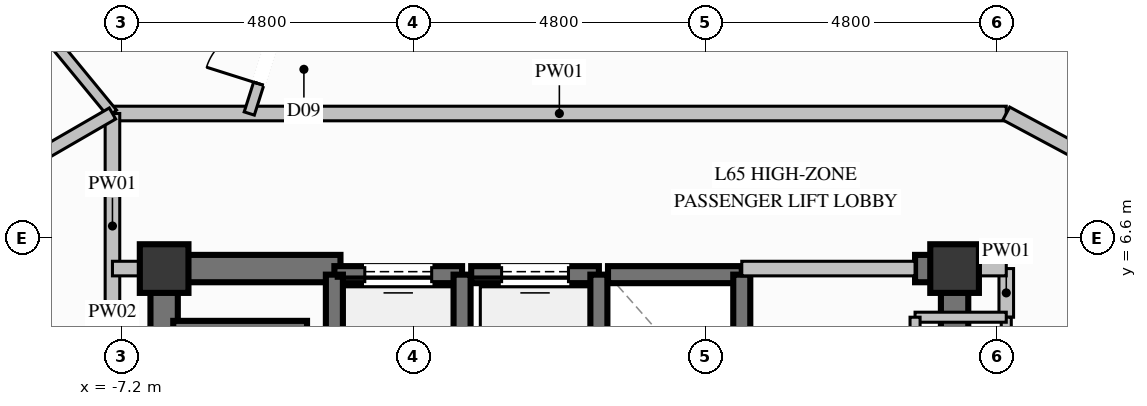
"""IFC4 building model, lengths in metres.
Left out: names, types, materials, properties, quantities, classifications, styles, units other than length and angle.
Written with IfcOpenShell. Run it as: python <this file> out.ifc"""

import sys

from ifc_helpers import new_model, si_unit, direction, frame, frame_2d, origin, origin_2d, place, context, subcontext, project, spatial, rectangle, extrude, element, fill, save


model = new_model("IFC4")
c1 = context("Model", 3, precision=1e-05, world=origin(), true_north=direction((0.0, 1.0)))
c2 = subcontext(c1, "Body", "Model", "MODEL_VIEW")
j1 = project(units=[si_unit("LENGTHUNIT", "METRE"), si_unit("PLANEANGLEUNIT", "RADIAN")], contexts=[c1])
p1 = place(None, origin())
s1 = spatial("IfcSite", under=j1, at=p1, CompositionType="ELEMENT")
p2 = place(p1, origin())
s2 = spatial("IfcBuilding", under=s1, at=p2, CompositionType="ELEMENT")
p3 = place(p2, frame((0.0, 0.0, 250.6)))
s3 = spatial("IfcBuildingStorey", under=s2, at=p3, CompositionType="ELEMENT", Elevation=250.6)
for number, where, z_axis, x_axis in (
    (1, (6.5, 6.1, 0.0), (0.0, 0.0, 1.0), (1.0, 0.0, 0.0)),
    (2, (-6.5, 6.1, 0.0), (0.0, 0.0, 1.0), (1.0, 0.0, 0.0)),
):
    element("IfcColumn", number, at=place(p3, frame(where, z_axis=z_axis, x_axis=x_axis)), inside=s3, PredefinedType="COLUMN", context=c2, shape_type="SweptSolid", body=[
        extrude(rectangle(XDim=0.8, YDim=0.8, at=origin_2d()), origin(), (0.0, 0.0, 1.0), 3.8),
    ])
p4 = place(p3, frame((-6.275, 6.1, 0.0), z_axis=(0.0, 0.0, 1.0), x_axis=(1.0, 0.0, 0.0)))
e3 = element("IfcWall", 3, at=p4, inside=s3, PredefinedType="SHEAR", context=c2, shape_type="SweptSolid", body=[
    extrude(rectangle(XDim=2.675, YDim=0.45, at=frame_2d((1.337, 0.0))), origin(), (0.0, 0.0, 1.0), 3.8),
])
p5 = place(p3, frame((5.85, 6.1, 0.0), z_axis=(0.0, 0.0, 1.0), x_axis=(1.0, 0.0, 0.0)))
e4 = element("IfcWall", 4, at=p5, inside=s3, PredefinedType="SHEAR", context=c2, shape_type="SweptSolid", body=[
    extrude(rectangle(XDim=0.425, YDim=0.45, at=frame_2d((0.212, 0.0))), origin(), (0.0, 0.0, 1.0), 3.8),
])
p6 = place(p3, frame((-6.5, 2.35, 0.0), z_axis=(0.0, 0.0, 1.0), x_axis=(0.0, 1.0, 0.0)))
e5 = element("IfcWall", 5, at=p6, inside=s3, PredefinedType="SHEAR", context=c2, shape_type="SweptSolid", body=[
    extrude(rectangle(XDim=3.975, YDim=0.45, at=frame_2d((1.987, 0.0))), origin(), (0.0, 0.0, 1.0), 3.8),
])
p7 = place(p3, frame((6.5, 3.35, 0.0), z_axis=(0.0, 0.0, 1.0), x_axis=(0.0, 1.0, 0.0)))
e6 = element("IfcWall", 6, at=p7, inside=s3, PredefinedType="SHEAR", context=c2, shape_type="SweptSolid", body=[
    extrude(rectangle(XDim=2.975, YDim=0.45, at=frame_2d((1.487, 0.0))), origin(), (0.0, 0.0, 1.0), 3.8),
])
p8 = place(p3, frame((-1.6, 6.0, 0.0), z_axis=(0.0, 0.0, 1.0), x_axis=(-1.0, 0.0, 0.0)))
e7 = element("IfcWall", 7, at=p8, inside=s3, PredefinedType="SOLIDWALL", context=c2, shape_type="SweptSolid", body=[
    extrude(rectangle(XDim=2.1, YDim=0.28, at=frame_2d((1.05, 0.0))), origin(), (0.0, 0.0, 1.0), 3.57),
])
p9 = place(p8, frame((0.5, 0.0, 0.0)))
e8 = element("IfcOpeningElement", 8, at=p9, cuts=e7, PredefinedType="OPENING", context=c2, shape_type="SweptSolid", body=[
    extrude(rectangle(XDim=1.1, YDim=2.2, at=frame_2d((0.55, 1.1))), frame((0.0, 0.15, 0.0), z_axis=(0.0, -1.0, 0.0), x_axis=(1.0, 0.0, 0.0)), (0.0, 0.0, 1.0), 0.3),
])
for number, where, z_axis, x_axis in (
    (9, (-3.7, 6.0, 0.0), (0.0, 0.0, 1.0), (0.0, -1.0, 0.0)),
    (10, (-1.6, 3.5, 0.0), (0.0, 0.0, 1.0), (0.0, 1.0, 0.0)),
):
    element("IfcWall", number, at=place(p3, frame(where, z_axis=z_axis, x_axis=x_axis)), inside=s3, PredefinedType="SOLIDWALL", context=c2, shape_type="SweptSolid", body=[
        extrude(rectangle(XDim=2.5, YDim=0.28, at=frame_2d((1.25, 0.0))), origin(), (0.0, 0.0, 1.0), 3.57),
    ])
p10 = place(p3, frame((0.65, 6.0, 0.0), z_axis=(0.0, 0.0, 1.0), x_axis=(-1.0, 0.0, 0.0)))
e11 = element("IfcWall", 11, at=p10, inside=s3, PredefinedType="SOLIDWALL", context=c2, shape_type="SweptSolid", body=[
    extrude(rectangle(XDim=2.1, YDim=0.28, at=frame_2d((1.05, 0.0))), origin(), (0.0, 0.0, 1.0), 3.57),
])
p11 = place(p10, frame((0.5, 0.0, 0.0)))
e12 = element("IfcOpeningElement", 12, at=p11, cuts=e11, PredefinedType="OPENING", context=c2, shape_type="SweptSolid", body=[
    extrude(rectangle(XDim=1.1, YDim=2.2, at=frame_2d((0.55, 1.1))), frame((0.0, 0.15, 0.0), z_axis=(0.0, -1.0, 0.0), x_axis=(1.0, 0.0, 0.0)), (0.0, 0.0, 1.0), 0.3),
])
p12 = place(p3, frame((0.65, 3.5, 0.0), z_axis=(0.0, 0.0, 1.0), x_axis=(0.0, 1.0, 0.0)))
e13 = element("IfcWall", 13, at=p12, inside=s3, PredefinedType="SOLIDWALL", context=c2, shape_type="SweptSolid", body=[
    extrude(rectangle(XDim=2.5, YDim=0.28, at=frame_2d((1.25, 0.0))), origin(), (0.0, 0.0, 1.0), 3.57),
])
p13 = place(p3, frame((3.0, 6.0, 0.0), z_axis=(0.0, 0.0, 1.0), x_axis=(-1.0, 0.0, 0.0)))
e14 = element("IfcWall", 14, at=p13, inside=s3, PredefinedType="SOLIDWALL", context=c2, shape_type="SweptSolid", body=[
    extrude(rectangle(XDim=2.2, YDim=0.28, at=frame_2d((1.1, 0.0))), origin(), (0.0, 0.0, 1.0), 3.57),
])
p14 = place(p3, frame((3.0, 3.5, 0.0), z_axis=(0.0, 0.0, 1.0), x_axis=(0.0, 1.0, 0.0)))
e15 = element("IfcWall", 15, at=p14, inside=s3, PredefinedType="SOLIDWALL", context=c2, shape_type="SweptSolid", body=[
    extrude(rectangle(XDim=2.5, YDim=0.28, at=frame_2d((1.25, 0.0))), origin(), (0.0, 0.0, 1.0), 3.57),
])
p15 = place(p3, frame((-4.15, 5.1, 0.0), z_axis=(0.0, 0.0, 1.0), x_axis=(-1.0, 0.0, 0.0)))
e16 = element("IfcWall", 16, at=p15, inside=s3, PredefinedType="SOLIDWALL", context=c2, shape_type="SweptSolid", body=[
    extrude(rectangle(XDim=2.2, YDim=0.28, at=frame_2d((1.1, 0.0))), origin(), (0.0, 0.0, 1.0), 3.57),
])
p16 = place(p3, frame((-7.35, 8.65, 0.0), z_axis=(0.0, 0.0, 1.0), x_axis=(1.0, 0.0, 0.0)))
e17 = element("IfcWall", 17, at=p16, inside=s3, PredefinedType="PARTITIONING", context=c2, shape_type="SweptSolid", body=[
    extrude(rectangle(XDim=14.7, YDim=0.24, at=frame_2d((7.35, 0.0))), origin(), (0.0, 0.0, 1.0), 3.57),
])
p17 = place(p3, frame((3.0, 6.1, 0.0), z_axis=(0.0, 0.0, 1.0), x_axis=(1.0, 0.0, 0.0)))
e18 = element("IfcWall", 18, at=p17, inside=s3, PredefinedType="PARTITIONING", context=c2, shape_type="SweptSolid", body=[
    extrude(rectangle(XDim=2.85, YDim=0.24, at=frame_2d((1.425, 0.0))), origin(), (0.0, 0.0, 1.0), 2.655),
])
p18 = place(p3, frame((7.35, 5.3, 0.0), z_axis=(0.0, 0.0, 1.0), x_axis=(0.0, 1.0, 0.0)))
e19 = element("IfcWall", 19, at=p18, inside=s3, PredefinedType="PARTITIONING", context=c2, shape_type="SweptSolid", body=[
    extrude(rectangle(XDim=0.8, YDim=0.24, at=frame_2d((0.4, 0.0))), origin(), (0.0, 0.0, 1.0), 2.655),
])
p19 = place(p3, frame((6.5, 6.1, 0.0), z_axis=(0.0, 0.0, 1.0), x_axis=(1.0, 0.0, 0.0)))
e20 = element("IfcWall", 20, at=p19, inside=s3, PredefinedType="PARTITIONING", context=c2, shape_type="SweptSolid", body=[
    extrude(rectangle(XDim=0.85, YDim=0.24, at=frame_2d((0.425, 0.0))), origin(), (0.0, 0.0, 1.0), 3.086),
])
p20 = place(p3, frame((-7.35, 4.95, 0.0), z_axis=(0.0, 0.0, 1.0), x_axis=(0.0, 1.0, 0.0)))
e21 = element("IfcWall", 21, at=p20, inside=s3, PredefinedType="PARTITIONING", context=c2, shape_type="SweptSolid", body=[
    extrude(rectangle(XDim=3.7, YDim=0.24, at=frame_2d((1.85, 0.0))), origin(), (0.0, 0.0, 1.0), 2.655),
])
p21 = place(p3, frame((-7.35, 6.1, 0.0), z_axis=(0.0, 0.0, 1.0), x_axis=(1.0, 0.0, 0.0)))
e22 = element("IfcWall", 22, at=p21, inside=s3, PredefinedType="PARTITIONING", context=c2, shape_type="SweptSolid", body=[
    extrude(rectangle(XDim=0.85, YDim=0.24, at=frame_2d((0.425, 0.0))), origin(), (0.0, 0.0, 1.0), 3.086),
])
p22 = place(p3, frame((7.35, 2.75, 0.0), z_axis=(0.0, 0.0, 1.0), x_axis=(0.0, 1.0, 0.0)))
e23 = element("IfcWall", 23, at=p22, inside=s3, PredefinedType="PARTITIONING", context=c2, shape_type="SweptSolid", body=[
    extrude(rectangle(XDim=2.55, YDim=0.165, at=frame_2d((1.275, 0.0))), origin(), (0.0, 0.0, 1.0), 3.57),
])
p23 = place(p22, frame((0.75, 0.0, 0.0)))
e24 = element("IfcOpeningElement", 24, at=p23, cuts=e23, PredefinedType="OPENING", context=c2, shape_type="SweptSolid", body=[
    extrude(rectangle(XDim=1.05, YDim=2.15, at=frame_2d((0.525, 1.075))), frame((0.0, 0.093, 0.0), z_axis=(0.0, -1.0, 0.0), x_axis=(1.0, 0.0, 0.0)), (0.0, 0.0, 1.0), 0.185),
])
p24 = place(p3, frame((7.35, 5.3, 0.0), z_axis=(0.0, 0.0, 1.0), x_axis=(-1.0, 0.0, 0.0)))
e25 = element("IfcWall", 25, at=p24, inside=s3, PredefinedType="PARTITIONING", context=c2, shape_type="SweptSolid", body=[
    extrude(rectangle(XDim=1.5, YDim=0.165, at=frame_2d((0.75, 0.0))), origin(), (0.0, 0.0, 1.0), 2.655),
])
p25 = place(p3, frame((5.85, 5.3, 0.0), z_axis=(0.0, 0.0, 1.0), x_axis=(0.0, -1.0, 0.0)))
e26 = element("IfcWall", 26, at=p25, inside=s3, PredefinedType="PARTITIONING", context=c2, shape_type="SweptSolid", body=[
    extrude(rectangle(XDim=2.55, YDim=0.165, at=frame_2d((1.275, 0.0))), origin(), (0.0, 0.0, 1.0), 2.655),
])
p26 = place(p3, frame((-8.779, 10.388, 0.0), z_axis=(0.0, 0.0, 1.0), x_axis=(0.635079503828, -0.772446777337, 0.0)))
e27 = element("IfcWall", 27, at=p26, inside=s3, PredefinedType="PLUMBINGWALL", context=c2, shape_type="SweptSolid", body=[
    extrude(rectangle(XDim=2.25, YDim=0.175, at=frame_2d((1.125, 0.0))), origin(), (0.0, 0.0, 1.0), 3.57),
])
p27 = place(p3, frame((-5.1, 8.65, 0.0), z_axis=(0.0, 0.0, 1.0), x_axis=(0.301724909856, 0.953395027663, 0.0)))
e28 = element("IfcWall", 28, at=p27, inside=s3, PredefinedType="PLUMBINGWALL", context=c2, shape_type="SweptSolid", body=[
    extrude(rectangle(XDim=1.929, YDim=0.175, at=frame_2d((0.964, 0.0))), origin(), (0.0, 0.0, 1.0), 3.57),
])
p28 = place(p27, frame((0.514, 0.0, 0.0)))
e29 = element("IfcOpeningElement", 29, at=p28, cuts=e28, PredefinedType="OPENING", context=c2, shape_type="SweptSolid", body=[
    extrude(rectangle(XDim=0.9, YDim=2.1, at=frame_2d((0.45, 1.05))), frame((0.0, 0.098, 0.0), z_axis=(0.0, -1.0, 0.0), x_axis=(1.0, 0.0, 0.0)), (0.0, 0.0, 1.0), 0.195),
])
p29 = place(p3, frame((-11.065, 6.5, 0.0), z_axis=(0.0, 0.0, 1.0), x_axis=(0.865506757898, 0.50089724698, 0.0)))
e30 = element("IfcWall", 30, at=p29, inside=s3, PredefinedType="PARTITIONING", context=c2, shape_type="SweptSolid", body=[
    extrude(rectangle(XDim=4.292, YDim=0.21, at=frame_2d((2.146, 0.0))), origin(), (0.0, 0.0, 1.0), 3.57),
])
p30 = place(p3, frame((7.35, 8.65, 0.0), z_axis=(0.0, 0.0, 1.0), x_axis=(0.881565227264, -0.472062231151, 0.0)))
e31 = element("IfcWall", 31, at=p30, inside=s3, PredefinedType="PARTITIONING", context=c2, shape_type="SweptSolid", body=[
    extrude(rectangle(XDim=4.554, YDim=0.24, at=frame_2d((2.277, 0.0))), origin(), (0.0, 0.0, 1.0), 3.57),
])
p31 = place(p30, frame((1.777, 0.0, 0.0)))
e32 = element("IfcOpeningElement", 32, at=p31, cuts=e31, PredefinedType="OPENING", context=c2, shape_type="SweptSolid", body=[
    extrude(rectangle(XDim=1.0, YDim=2.2, at=frame_2d((0.5, 1.1))), frame((0.0, 0.13, 0.0), z_axis=(0.0, -1.0, 0.0), x_axis=(1.0, 0.0, 0.0)), (0.0, 0.0, 1.0), 0.26),
])
p32 = place(p9, origin())
e33 = element("IfcDoor", 33, at=p32, inside=s3, OperationType="SLIDING_TO_LEFT", PredefinedType="DOOR", context=c2, shape_type="SweptSolid", body=[
    extrude(rectangle(XDim=1.1, YDim=2.2, at=frame_2d((0.55, 1.1))), frame((0.0, 0.025, 0.0), z_axis=(0.0, -1.0, 0.0), x_axis=(1.0, 0.0, 0.0)), (0.0, 0.0, 1.0), 0.05),
])
fill(e8, e33)
p33 = place(p11, origin())
e34 = element("IfcDoor", 34, at=p33, inside=s3, OperationType="SLIDING_TO_LEFT", PredefinedType="DOOR", context=c2, shape_type="SweptSolid", body=[
    extrude(rectangle(XDim=1.1, YDim=2.2, at=frame_2d((0.55, 1.1))), frame((0.0, 0.025, 0.0), z_axis=(0.0, -1.0, 0.0), x_axis=(1.0, 0.0, 0.0)), (0.0, 0.0, 1.0), 0.05),
])
fill(e12, e34)
p34 = place(p28, origin())
e35 = element("IfcDoor", 35, at=p34, inside=s3, OperationType="SINGLE_SWING_LEFT", PredefinedType="DOOR", context=c2, shape_type="SweptSolid", body=[
    extrude(rectangle(XDim=0.9, YDim=2.1, at=frame_2d((0.45, 1.05))), frame((0.0, 0.025, 0.0), z_axis=(0.0, -1.0, 0.0), x_axis=(1.0, 0.0, 0.0)), (0.0, 0.0, 1.0), 0.05),
])
fill(e29, e35)
save(model, sys.argv[1])
